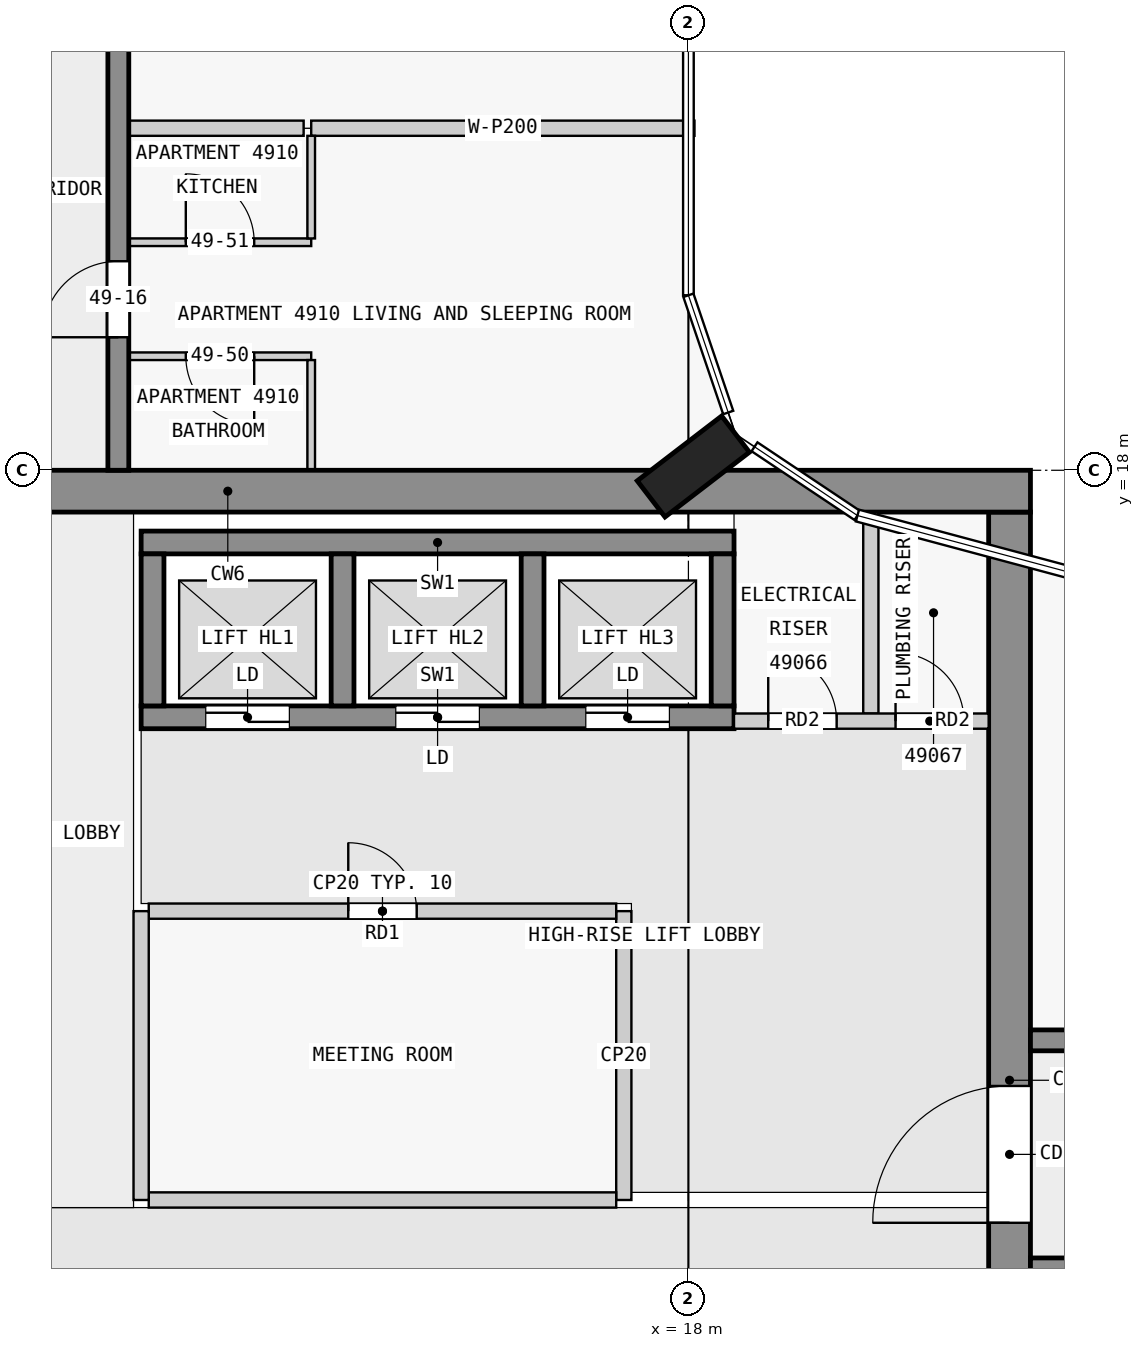
"""IFC4 building model, lengths in metres.
Left out: names, types, materials, properties, quantities, classifications, styles, units other than length and angle.
Written with IfcOpenShell. Run it as: python <this file> out.ifc"""

import sys

from ifc_helpers import new_model, si_unit, direction, frame, frame_2d, origin, origin_2d, place, context, subcontext, project, spatial, rectangle, extrude, element, fill, save


model = new_model("IFC4")
c1 = context("Model", 3, precision=1e-05, world=origin(), true_north=direction((0.0, 1.0)))
c2 = subcontext(c1, "Body", "Model", "MODEL_VIEW")
j1 = project(units=[si_unit("LENGTHUNIT", "METRE"), si_unit("PLANEANGLEUNIT", "RADIAN")], contexts=[c1])
p1 = place(None, origin())
s1 = spatial("IfcSite", under=j1, at=p1, CompositionType="ELEMENT")
p2 = place(p1, origin())
s2 = spatial("IfcBuilding", under=s1, at=p2, CompositionType="ELEMENT")
p3 = place(p2, frame((0.0, 0.0, 190.9)))
s3 = spatial("IfcBuildingStorey", under=s2, at=p3, CompositionType="ELEMENT", Elevation=190.9)
p4 = place(p3, frame((18.065, 18.05, 0.0), z_axis=(0.0, 0.0, 1.0), x_axis=(-0.608810846443, 0.793315418515, 0.0)))
e1 = element("IfcColumn", 1, at=p4, inside=s3, PredefinedType="COLUMN", context=c2, shape_type="SweptSolid", body=[
    extrude(rectangle(XDim=0.6, YDim=1.4, at=origin_2d()), origin(), (0.0, 0.0, 1.0), 3.5),
])
p5 = place(p3, frame((1.38, 17.725, 0.0), z_axis=(0.0, 0.0, 1.0), x_axis=(1.0, 0.0, 0.0)))
e2 = element("IfcWall", 2, at=p5, inside=s3, PredefinedType="SHEAR", context=c2, shape_type="SweptSolid", body=[
    extrude(rectangle(XDim=21.12, YDim=0.55, at=frame_2d((10.56, 0.0))), origin(), (0.0, 0.0, 1.0), 3.25),
])
p6 = place(p5, frame((6.35, 0.0, 0.0)))
e3 = element("IfcOpeningElement", 3, at=p6, cuts=e2, PredefinedType="OPENING", context=c2, shape_type="SweptSolid", body=[
    extrude(rectangle(XDim=1.8, YDim=2.1, at=frame_2d((0.9, 1.05))), frame((0.0, 0.285, 0.0), z_axis=(0.0, -1.0, 0.0), x_axis=(1.0, 0.0, 0.0)), (0.0, 0.0, 1.0), 0.57),
])
p7 = place(p3, frame((22.225, 2.5, 0.0), z_axis=(0.0, 0.0, 1.0), x_axis=(0.0, 1.0, 0.0)))
e4 = element("IfcWall", 4, at=p7, inside=s3, PredefinedType="SHEAR", context=c2, shape_type="SweptSolid", body=[
    extrude(rectangle(XDim=14.95, YDim=0.55, at=frame_2d((7.475, 0.0))), origin(), (0.0, 0.0, 1.0), 3.25),
])
p8 = place(p7, frame((5.6, 0.0, 0.0)))
e5 = element("IfcOpeningElement", 5, at=p8, cuts=e4, PredefinedType="OPENING", context=c2, shape_type="SweptSolid", body=[
    extrude(rectangle(XDim=1.8, YDim=2.1, at=frame_2d((0.9, 1.05))), frame((0.0, 0.285, 0.0), z_axis=(0.0, -1.0, 0.0), x_axis=(1.0, 0.0, 0.0)), (0.0, 0.0, 1.0), 0.57),
])
p9 = place(p3, frame((10.8, 17.05, 0.0), z_axis=(0.0, 0.0, 1.0), x_axis=(1.0, 0.0, 0.0)))
e6 = element("IfcWall", 6, at=p9, inside=s3, PredefinedType="SHEAR", context=c2, shape_type="SweptSolid", body=[
    extrude(rectangle(XDim=7.8, YDim=0.3, at=frame_2d((3.9, 0.0))), origin(), (0.0, 0.0, 1.0), 3.25),
])
p10 = place(p3, frame((10.8, 14.75, 0.0), z_axis=(0.0, 0.0, 1.0), x_axis=(1.0, 0.0, 0.0)))
e7 = element("IfcWall", 7, at=p10, inside=s3, PredefinedType="SHEAR", context=c2, shape_type="SweptSolid", body=[
    extrude(rectangle(XDim=7.8, YDim=0.3, at=frame_2d((3.9, 0.0))), origin(), (0.0, 0.0, 1.0), 3.25),
])
p11 = place(p10, frame((0.85, 0.0, 0.0)))
e8 = element("IfcOpeningElement", 8, at=p11, cuts=e7, PredefinedType="OPENING", context=c2, shape_type="SweptSolid", body=[
    extrude(rectangle(XDim=1.1, YDim=2.1, at=frame_2d((0.55, 1.05))), frame((0.0, 0.16, 0.0), z_axis=(0.0, -1.0, 0.0), x_axis=(1.0, 0.0, 0.0)), (0.0, 0.0, 1.0), 0.32),
])
p12 = place(p10, frame((3.35, 0.0, 0.0)))
e9 = element("IfcOpeningElement", 9, at=p12, cuts=e7, PredefinedType="OPENING", context=c2, shape_type="SweptSolid", body=[
    extrude(rectangle(XDim=1.1, YDim=2.1, at=frame_2d((0.55, 1.05))), frame((0.0, 0.16, 0.0), z_axis=(0.0, -1.0, 0.0), x_axis=(1.0, 0.0, 0.0)), (0.0, 0.0, 1.0), 0.32),
])
p13 = place(p10, frame((5.85, 0.0, 0.0)))
e10 = element("IfcOpeningElement", 10, at=p13, cuts=e7, PredefinedType="OPENING", context=c2, shape_type="SweptSolid", body=[
    extrude(rectangle(XDim=1.1, YDim=2.1, at=frame_2d((0.55, 1.05))), frame((0.0, 0.16, 0.0), z_axis=(0.0, -1.0, 0.0), x_axis=(1.0, 0.0, 0.0)), (0.0, 0.0, 1.0), 0.32),
])
for number, where, z_axis, x_axis in (
    (11, (10.95, 14.9, 0.0), (0.0, 0.0, 1.0), (0.0, 1.0, 0.0)),
    (12, (13.45, 14.9, 0.0), (0.0, 0.0, 1.0), (0.0, 1.0, 0.0)),
    (13, (15.95, 14.9, 0.0), (0.0, 0.0, 1.0), (0.0, 1.0, 0.0)),
    (14, (18.45, 14.9, 0.0), (0.0, 0.0, 1.0), (0.0, 1.0, 0.0)),
):
    element("IfcWall", number, at=place(p3, frame(where, z_axis=z_axis, x_axis=x_axis)), inside=s3, PredefinedType="SHEAR", context=c2, shape_type="SweptSolid", body=[
        extrude(rectangle(XDim=2.0, YDim=0.3, at=frame_2d((1.0, 0.0))), origin(), (0.0, 0.0, 1.0), 3.25),
    ])
p14 = place(p3, frame((22.5, 7.5, 0.0), z_axis=(0.0, 0.0, 1.0), x_axis=(1.0, 0.0, 0.0)))
e15 = element("IfcWall", 15, at=p14, inside=s3, PredefinedType="SHEAR", context=c2, shape_type="SweptSolid", body=[
    extrude(rectangle(XDim=22.5, YDim=0.275, at=frame_2d((11.25, 0.0))), origin(), (0.0, 0.0, 1.0), 3.25),
])
p15 = place(p14, frame((1.75, 0.0, 0.0)))
e16 = element("IfcOpeningElement", 16, at=p15, cuts=e15, PredefinedType="OPENING", context=c2, shape_type="SweptSolid", body=[
    extrude(rectangle(XDim=1.0, YDim=2.1, at=frame_2d((0.5, 1.05))), frame((0.0, 0.147, 0.0), z_axis=(0.0, -1.0, 0.0), x_axis=(1.0, 0.0, 0.0)), (0.0, 0.0, 1.0), 0.295),
])
p16 = place(p14, frame((5.85, 0.0, 0.0)))
e17 = element("IfcOpeningElement", 17, at=p16, cuts=e15, PredefinedType="OPENING", context=c2, shape_type="SweptSolid", body=[
    extrude(rectangle(XDim=1.8, YDim=2.1, at=frame_2d((0.9, 1.05))), frame((0.0, 0.147, 0.0), z_axis=(0.0, -1.0, 0.0), x_axis=(1.0, 0.0, 0.0)), (0.0, 0.0, 1.0), 0.295),
])
p17 = place(p14, frame((10.75, 0.0, 0.0)))
e18 = element("IfcOpeningElement", 18, at=p17, cuts=e15, PredefinedType="OPENING", context=c2, shape_type="SweptSolid", body=[
    extrude(rectangle(XDim=1.0, YDim=2.1, at=frame_2d((0.5, 1.05))), frame((0.0, 0.147, 0.0), z_axis=(0.0, -1.0, 0.0), x_axis=(1.0, 0.0, 0.0)), (0.0, 0.0, 1.0), 0.295),
])
p18 = place(p14, frame((16.85, 0.0, 0.0)))
e19 = element("IfcOpeningElement", 19, at=p18, cuts=e15, PredefinedType="OPENING", context=c2, shape_type="SweptSolid", body=[
    extrude(rectangle(XDim=1.0, YDim=2.1, at=frame_2d((0.5, 1.05))), frame((0.0, 0.147, 0.0), z_axis=(0.0, -1.0, 0.0), x_axis=(1.0, 0.0, 0.0)), (0.0, 0.0, 1.0), 0.295),
])
p19 = place(p3, frame((22.5, 10.5, 0.0), z_axis=(0.0, 0.0, 1.0), x_axis=(1.0, 0.0, 0.0)))
e20 = element("IfcWall", 20, at=p19, inside=s3, PredefinedType="SHEAR", context=c2, shape_type="SweptSolid", body=[
    extrude(rectangle(XDim=22.5, YDim=0.275, at=frame_2d((11.25, 0.0))), origin(), (0.0, 0.0, 1.0), 3.25),
])
p20 = place(p19, frame((1.75, 0.0, 0.0)))
e21 = element("IfcOpeningElement", 21, at=p20, cuts=e20, PredefinedType="OPENING", context=c2, shape_type="SweptSolid", body=[
    extrude(rectangle(XDim=1.0, YDim=2.1, at=frame_2d((0.5, 1.05))), frame((0.0, 0.147, 0.0), z_axis=(0.0, -1.0, 0.0), x_axis=(1.0, 0.0, 0.0)), (0.0, 0.0, 1.0), 0.295),
])
p21 = place(p19, frame((6.25, 0.0, 0.0)))
e22 = element("IfcOpeningElement", 22, at=p21, cuts=e20, PredefinedType="OPENING", context=c2, shape_type="SweptSolid", body=[
    extrude(rectangle(XDim=1.0, YDim=2.1, at=frame_2d((0.5, 1.05))), frame((0.0, 0.147, 0.0), z_axis=(0.0, -1.0, 0.0), x_axis=(1.0, 0.0, 0.0)), (0.0, 0.0, 1.0), 0.295),
])
p22 = place(p19, frame((10.75, 0.0, 0.0)))
e23 = element("IfcOpeningElement", 23, at=p22, cuts=e20, PredefinedType="OPENING", context=c2, shape_type="SweptSolid", body=[
    extrude(rectangle(XDim=1.0, YDim=2.1, at=frame_2d((0.5, 1.05))), frame((0.0, 0.147, 0.0), z_axis=(0.0, -1.0, 0.0), x_axis=(1.0, 0.0, 0.0)), (0.0, 0.0, 1.0), 0.295),
])
p23 = place(p19, frame((15.25, 0.0, 0.0)))
e24 = element("IfcOpeningElement", 24, at=p23, cuts=e20, PredefinedType="OPENING", context=c2, shape_type="SweptSolid", body=[
    extrude(rectangle(XDim=1.0, YDim=2.1, at=frame_2d((0.5, 1.05))), frame((0.0, 0.147, 0.0), z_axis=(0.0, -1.0, 0.0), x_axis=(1.0, 0.0, 0.0)), (0.0, 0.0, 1.0), 0.295),
])
p24 = place(p19, frame((18.75, 0.0, 0.0)))
e25 = element("IfcOpeningElement", 25, at=p24, cuts=e20, PredefinedType="OPENING", context=c2, shape_type="SweptSolid", body=[
    extrude(rectangle(XDim=0.9, YDim=2.1, at=frame_2d((0.45, 1.05))), frame((0.0, 0.147, 0.0), z_axis=(0.0, -1.0, 0.0), x_axis=(1.0, 0.0, 0.0)), (0.0, 0.0, 1.0), 0.295),
])
p25 = place(p19, frame((20.95, 0.0, 0.0)))
e26 = element("IfcOpeningElement", 26, at=p25, cuts=e20, PredefinedType="OPENING", context=c2, shape_type="SweptSolid", body=[
    extrude(rectangle(XDim=1.0, YDim=2.1, at=frame_2d((0.5, 1.05))), frame((0.0, 0.147, 0.0), z_axis=(0.0, -1.0, 0.0), x_axis=(1.0, 0.0, 0.0)), (0.0, 0.0, 1.0), 0.295),
])
p26 = place(p3, frame((10.5, 18.0, 0.0), z_axis=(0.0, 0.0, 1.0), x_axis=(0.0, 1.0, 0.0)))
e27 = element("IfcWall", 27, at=p26, inside=s3, PredefinedType="SHEAR", context=c2, shape_type="SweptSolid", body=[
    extrude(rectangle(XDim=27.0, YDim=0.275, at=frame_2d((13.5, 0.0))), origin(), (0.0, 0.0, 1.0), 3.25),
])
p27 = place(p26, frame((1.75, 0.0, 0.0)))
e28 = element("IfcOpeningElement", 28, at=p27, cuts=e27, PredefinedType="OPENING", context=c2, shape_type="SweptSolid", body=[
    extrude(rectangle(XDim=1.0, YDim=2.1, at=frame_2d((0.5, 1.05))), frame((0.0, 0.147, 0.0), z_axis=(0.0, -1.0, 0.0), x_axis=(1.0, 0.0, 0.0)), (0.0, 0.0, 1.0), 0.295),
])
p28 = place(p26, frame((6.25, 0.0, 0.0)))
e29 = element("IfcOpeningElement", 29, at=p28, cuts=e27, PredefinedType="OPENING", context=c2, shape_type="SweptSolid", body=[
    extrude(rectangle(XDim=1.0, YDim=2.1, at=frame_2d((0.5, 1.05))), frame((0.0, 0.147, 0.0), z_axis=(0.0, -1.0, 0.0), x_axis=(1.0, 0.0, 0.0)), (0.0, 0.0, 1.0), 0.295),
])
p29 = place(p26, frame((15.25, 0.0, 0.0)))
e30 = element("IfcOpeningElement", 30, at=p29, cuts=e27, PredefinedType="OPENING", context=c2, shape_type="SweptSolid", body=[
    extrude(rectangle(XDim=1.0, YDim=2.1, at=frame_2d((0.5, 1.05))), frame((0.0, 0.147, 0.0), z_axis=(0.0, -1.0, 0.0), x_axis=(1.0, 0.0, 0.0)), (0.0, 0.0, 1.0), 0.295),
])
p30 = place(p26, frame((19.75, 0.0, 0.0)))
e31 = element("IfcOpeningElement", 31, at=p30, cuts=e27, PredefinedType="OPENING", context=c2, shape_type="SweptSolid", body=[
    extrude(rectangle(XDim=1.0, YDim=2.1, at=frame_2d((0.5, 1.05))), frame((0.0, 0.147, 0.0), z_axis=(0.0, -1.0, 0.0), x_axis=(1.0, 0.0, 0.0)), (0.0, 0.0, 1.0), 0.295),
])
p31 = place(p26, frame((23.25, 0.0, 0.0)))
e32 = element("IfcOpeningElement", 32, at=p31, cuts=e27, PredefinedType="OPENING", context=c2, shape_type="SweptSolid", body=[
    extrude(rectangle(XDim=0.9, YDim=2.1, at=frame_2d((0.45, 1.05))), frame((0.0, 0.147, 0.0), z_axis=(0.0, -1.0, 0.0), x_axis=(1.0, 0.0, 0.0)), (0.0, 0.0, 1.0), 0.295),
])
p32 = place(p26, frame((25.45, 0.0, 0.0)))
e33 = element("IfcOpeningElement", 33, at=p32, cuts=e27, PredefinedType="OPENING", context=c2, shape_type="SweptSolid", body=[
    extrude(rectangle(XDim=1.0, YDim=2.1, at=frame_2d((0.5, 1.05))), frame((0.0, 0.147, 0.0), z_axis=(0.0, -1.0, 0.0), x_axis=(1.0, 0.0, 0.0)), (0.0, 0.0, 1.0), 0.295),
])
p33 = place(p3, frame((10.8, 8.4, 0.0), z_axis=(0.0, 0.0, 1.0), x_axis=(0.0, 1.0, 0.0)))
e34 = element("IfcWall", 34, at=p33, inside=s3, PredefinedType="PARTITIONING", context=c2, shape_type="SweptSolid", body=[
    extrude(rectangle(XDim=3.8, YDim=0.2, at=frame_2d((1.9, 0.0))), origin(), (0.0, 0.0, 1.0), 3.25),
])
p34 = place(p3, frame((10.9, 8.4, 0.0), z_axis=(0.0, 0.0, 1.0), x_axis=(1.0, 0.0, 0.0)))
e35 = element("IfcWall", 35, at=p34, inside=s3, PredefinedType="PARTITIONING", context=c2, shape_type="SweptSolid", body=[
    extrude(rectangle(XDim=6.15, YDim=0.2, at=frame_2d((3.075, 0.0))), origin(), (0.0, 0.0, 1.0), 3.25),
])
p35 = place(p3, frame((17.15, 8.4, 0.0), z_axis=(0.0, 0.0, 1.0), x_axis=(0.0, 1.0, 0.0)))
e36 = element("IfcWall", 36, at=p35, inside=s3, PredefinedType="PARTITIONING", context=c2, shape_type="SweptSolid", body=[
    extrude(rectangle(XDim=3.8, YDim=0.2, at=frame_2d((1.9, 0.0))), origin(), (0.0, 0.0, 1.0), 3.25),
])
p36 = place(p3, frame((10.9, 12.2, 0.0), z_axis=(0.0, 0.0, 1.0), x_axis=(1.0, 0.0, 0.0)))
e37 = element("IfcWall", 37, at=p36, inside=s3, PredefinedType="PARTITIONING", context=c2, shape_type="SweptSolid", body=[
    extrude(rectangle(XDim=6.15, YDim=0.2, at=frame_2d((3.075, 0.0))), origin(), (0.0, 0.0, 1.0), 3.25),
])
p37 = place(p36, frame((2.625, 0.0, 0.0)))
e38 = element("IfcOpeningElement", 38, at=p37, cuts=e37, PredefinedType="OPENING", context=c2, shape_type="SweptSolid", body=[
    extrude(rectangle(XDim=0.9, YDim=2.1, at=frame_2d((0.45, 1.05))), frame((0.0, 0.11, 0.0), z_axis=(0.0, -1.0, 0.0), x_axis=(1.0, 0.0, 0.0)), (0.0, 0.0, 1.0), 0.22),
])
p38 = place(p3, frame((18.6, 14.7, 0.0), z_axis=(0.0, 0.0, 1.0), x_axis=(1.0, 0.0, 0.0)))
e39 = element("IfcWall", 39, at=p38, inside=s3, PredefinedType="PARTITIONING", context=c2, shape_type="SweptSolid", body=[
    extrude(rectangle(XDim=3.35, YDim=0.2, at=frame_2d((1.675, 0.0))), origin(), (0.0, 0.0, 1.0), 3.25),
])
p39 = place(p38, frame((0.45, 0.0, 0.0)))
e40 = element("IfcOpeningElement", 40, at=p39, cuts=e39, PredefinedType="OPENING", context=c2, shape_type="SweptSolid", body=[
    extrude(rectangle(XDim=0.9, YDim=2.1, at=frame_2d((0.45, 1.05))), frame((0.0, 0.11, 0.0), z_axis=(0.0, -1.0, 0.0), x_axis=(1.0, 0.0, 0.0)), (0.0, 0.0, 1.0), 0.22),
])
p40 = place(p38, frame((2.125, 0.0, 0.0)))
e41 = element("IfcOpeningElement", 41, at=p40, cuts=e39, PredefinedType="OPENING", context=c2, shape_type="SweptSolid", body=[
    extrude(rectangle(XDim=0.9, YDim=2.1, at=frame_2d((0.45, 1.05))), frame((0.0, 0.11, 0.0), z_axis=(0.0, -1.0, 0.0), x_axis=(1.0, 0.0, 0.0)), (0.0, 0.0, 1.0), 0.22),
])
p41 = place(p3, frame((20.4, 14.8, 0.0), z_axis=(0.0, 0.0, 1.0), x_axis=(0.0, 1.0, 0.0)))
e42 = element("IfcWall", 42, at=p41, inside=s3, PredefinedType="PARTITIONING", context=c2, shape_type="SweptSolid", body=[
    extrude(rectangle(XDim=2.65, YDim=0.2, at=frame_2d((1.325, 0.0))), origin(), (0.0, 0.0, 1.0), 3.25),
])
p42 = place(p3, frame((13.038, 19.5, 0.0), z_axis=(0.0, 0.0, 1.0), x_axis=(-1.0, 0.0, 0.0)))
e43 = element("IfcWall", 43, at=p42, inside=s3, PredefinedType="PARTITIONING", context=c2, shape_type="SweptSolid", body=[
    extrude(rectangle(XDim=2.4, YDim=0.1, at=frame_2d((1.2, 0.0))), origin(), (0.0, 0.0, 1.0), 3.25),
])
p43 = place(p42, frame((0.75, 0.0, 0.0)))
e44 = element("IfcOpeningElement", 44, at=p43, cuts=e43, PredefinedType="OPENING", context=c2, shape_type="SweptSolid", body=[
    extrude(rectangle(XDim=0.9, YDim=2.1, at=frame_2d((0.45, 1.05))), frame((0.0, 0.06, 0.0), z_axis=(0.0, -1.0, 0.0), x_axis=(1.0, 0.0, 0.0)), (0.0, 0.0, 1.0), 0.12),
])
p44 = place(p3, frame((10.637, 21.0, 0.0), z_axis=(0.0, 0.0, 1.0), x_axis=(1.0, 0.0, 0.0)))
e45 = element("IfcWall", 45, at=p44, inside=s3, PredefinedType="PARTITIONING", context=c2, shape_type="SweptSolid", body=[
    extrude(rectangle(XDim=2.4, YDim=0.1, at=frame_2d((1.2, 0.0))), origin(), (0.0, 0.0, 1.0), 3.25),
])
p45 = place(p44, frame((0.75, 0.0, 0.0)))
e46 = element("IfcOpeningElement", 46, at=p45, cuts=e45, PredefinedType="OPENING", context=c2, shape_type="SweptSolid", body=[
    extrude(rectangle(XDim=0.9, YDim=2.1, at=frame_2d((0.45, 1.05))), frame((0.0, 0.06, 0.0), z_axis=(0.0, -1.0, 0.0), x_axis=(1.0, 0.0, 0.0)), (0.0, 0.0, 1.0), 0.12),
])
p46 = place(p3, frame((12.938, 22.5, 0.0), z_axis=(0.0, 0.0, 1.0), x_axis=(-1.0, 0.0, 0.0)))
e47 = element("IfcWall", 47, at=p46, inside=s3, PredefinedType="PARTITIONING", context=c2, shape_type="SweptSolid", body=[
    extrude(rectangle(XDim=2.3, YDim=0.2, at=frame_2d((1.15, 0.0))), origin(), (0.0, 0.0, 1.0), 3.25),
])
p47 = place(p3, frame((13.038, 22.5, 0.0), z_axis=(0.0, 0.0, 1.0), x_axis=(1.0, 0.0, 0.0)))
e48 = element("IfcWall", 48, at=p47, inside=s3, PredefinedType="PARTITIONING", context=c2, shape_type="SweptSolid", body=[
    extrude(rectangle(XDim=5.042, YDim=0.2, at=frame_2d((2.521, 0.0))), origin(), (0.0, 0.0, 1.0), 3.25),
])
p48 = place(p3, frame((13.038, 18.0, 0.0), z_axis=(0.0, 0.0, 1.0), x_axis=(0.0, 1.0, 0.0)))
e49 = element("IfcWall", 49, at=p48, inside=s3, PredefinedType="PARTITIONING", context=c2, shape_type="SweptSolid", body=[
    extrude(rectangle(XDim=1.45, YDim=0.1, at=frame_2d((0.725, 0.0))), origin(), (0.0, 0.0, 1.0), 3.25),
])
p49 = place(p3, frame((13.038, 21.05, 0.0), z_axis=(0.0, 0.0, 1.0), x_axis=(0.0, 1.0, 0.0)))
e50 = element("IfcWall", 50, at=p49, inside=s3, PredefinedType="PARTITIONING", context=c2, shape_type="SweptSolid", body=[
    extrude(rectangle(XDim=1.35, YDim=0.1, at=frame_2d((0.675, 0.0))), origin(), (0.0, 0.0, 1.0), 3.25),
])
p50 = place(p37, origin())
e51 = element("IfcDoor", 51, at=p50, inside=s3, OperationType="SINGLE_SWING_LEFT", PredefinedType="DOOR", context=c2, shape_type="SweptSolid", body=[
    extrude(rectangle(XDim=0.9, YDim=2.1, at=frame_2d((0.45, 1.05))), frame((0.0, 0.025, 0.0), z_axis=(0.0, -1.0, 0.0), x_axis=(1.0, 0.0, 0.0)), (0.0, 0.0, 1.0), 0.05),
])
fill(e38, e51)
p51 = place(p11, origin())
e52 = element("IfcDoor", 52, at=p51, inside=s3, OperationType="DOUBLE_DOOR_SLIDING", PredefinedType="DOOR", context=c2, shape_type="SweptSolid", body=[
    extrude(rectangle(XDim=1.1, YDim=2.1, at=frame_2d((0.55, 1.05))), frame((0.0, 0.025, 0.0), z_axis=(0.0, -1.0, 0.0), x_axis=(1.0, 0.0, 0.0)), (0.0, 0.0, 1.0), 0.05),
])
fill(e8, e52)
p52 = place(p12, origin())
e53 = element("IfcDoor", 53, at=p52, inside=s3, OperationType="DOUBLE_DOOR_SLIDING", PredefinedType="DOOR", context=c2, shape_type="SweptSolid", body=[
    extrude(rectangle(XDim=1.1, YDim=2.1, at=frame_2d((0.55, 1.05))), frame((0.0, 0.025, 0.0), z_axis=(0.0, -1.0, 0.0), x_axis=(1.0, 0.0, 0.0)), (0.0, 0.0, 1.0), 0.05),
])
fill(e9, e53)
p53 = place(p13, origin())
e54 = element("IfcDoor", 54, at=p53, inside=s3, OperationType="DOUBLE_DOOR_SLIDING", PredefinedType="DOOR", context=c2, shape_type="SweptSolid", body=[
    extrude(rectangle(XDim=1.1, YDim=2.1, at=frame_2d((0.55, 1.05))), frame((0.0, 0.025, 0.0), z_axis=(0.0, -1.0, 0.0), x_axis=(1.0, 0.0, 0.0)), (0.0, 0.0, 1.0), 0.05),
])
fill(e10, e54)
p54 = place(p8, origin())
e55 = element("IfcDoor", 55, at=p54, inside=s3, OperationType="DOUBLE_DOOR_SINGLE_SWING", PredefinedType="DOOR", context=c2, shape_type="SweptSolid", body=[
    extrude(rectangle(XDim=1.8, YDim=2.1, at=frame_2d((0.9, 1.05))), frame((0.0, 0.025, 0.0), z_axis=(0.0, -1.0, 0.0), x_axis=(1.0, 0.0, 0.0)), (0.0, 0.0, 1.0), 0.05),
])
fill(e5, e55)
p55 = place(p39, origin())
e56 = element("IfcDoor", 56, at=p55, inside=s3, OperationType="SINGLE_SWING_LEFT", PredefinedType="DOOR", context=c2, shape_type="SweptSolid", body=[
    extrude(rectangle(XDim=0.9, YDim=2.1, at=frame_2d((0.45, 1.05))), frame((0.0, 0.025, 0.0), z_axis=(0.0, -1.0, 0.0), x_axis=(1.0, 0.0, 0.0)), (0.0, 0.0, 1.0), 0.05),
])
fill(e40, e56)
p56 = place(p40, origin())
e57 = element("IfcDoor", 57, at=p56, inside=s3, OperationType="SINGLE_SWING_LEFT", PredefinedType="DOOR", context=c2, shape_type="SweptSolid", body=[
    extrude(rectangle(XDim=0.9, YDim=2.1, at=frame_2d((0.45, 1.05))), frame((0.0, 0.025, 0.0), z_axis=(0.0, -1.0, 0.0), x_axis=(1.0, 0.0, 0.0)), (0.0, 0.0, 1.0), 0.05),
])
fill(e41, e57)
p57 = place(p27, origin())
e58 = element("IfcDoor", 58, at=p57, inside=s3, OperationType="SINGLE_SWING_LEFT", PredefinedType="DOOR", context=c2, shape_type="SweptSolid", body=[
    extrude(rectangle(XDim=1.0, YDim=2.1, at=frame_2d((0.5, 1.05))), frame((0.0, 0.025, 0.0), z_axis=(0.0, -1.0, 0.0), x_axis=(1.0, 0.0, 0.0)), (0.0, 0.0, 1.0), 0.05),
])
fill(e28, e58)
p58 = place(p43, origin())
e59 = element("IfcDoor", 59, at=p58, inside=s3, OperationType="SINGLE_SWING_LEFT", PredefinedType="DOOR", context=c2, shape_type="SweptSolid", body=[
    extrude(rectangle(XDim=0.9, YDim=2.1, at=frame_2d((0.45, 1.05))), frame((0.0, 0.025, 0.0), z_axis=(0.0, -1.0, 0.0), x_axis=(1.0, 0.0, 0.0)), (0.0, 0.0, 1.0), 0.05),
])
fill(e44, e59)
p59 = place(p45, origin())
e60 = element("IfcDoor", 60, at=p59, inside=s3, OperationType="SINGLE_SWING_LEFT", PredefinedType="DOOR", context=c2, shape_type="SweptSolid", body=[
    extrude(rectangle(XDim=0.9, YDim=2.1, at=frame_2d((0.45, 1.05))), frame((0.0, 0.025, 0.0), z_axis=(0.0, -1.0, 0.0), x_axis=(1.0, 0.0, 0.0)), (0.0, 0.0, 1.0), 0.05),
])
fill(e46, e60)
save(model, sys.argv[1])
